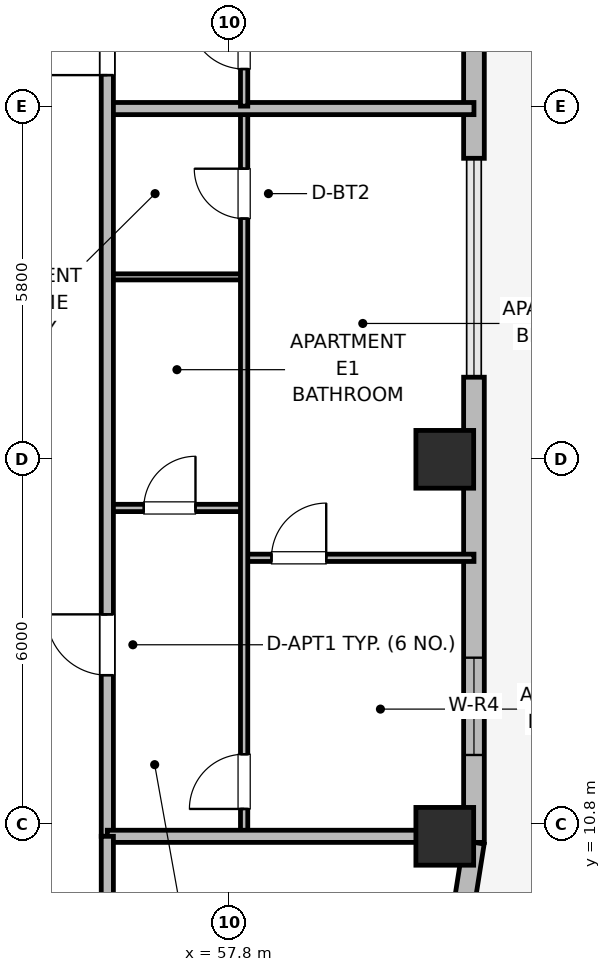
"""IFC4 building model, lengths in metres.
Left out: names, types, materials, properties, quantities, classifications, styles, units other than length and angle.
Written with IfcOpenShell. Run it as: python <this file> out.ifc"""

import sys

from ifc_helpers import new_model, si_unit, direction, frame, frame_2d, origin, origin_2d, place, context, subcontext, project, spatial, rectangle, extrude, element, fill, save


model = new_model("IFC4")
c1 = context("Model", 3, precision=1e-05, world=origin(), true_north=direction((0.0, 1.0)))
c2 = subcontext(c1, "Body", "Model", "MODEL_VIEW")
j1 = project(units=[si_unit("LENGTHUNIT", "METRE"), si_unit("PLANEANGLEUNIT", "RADIAN")], contexts=[c1])
p1 = place(None, origin())
s1 = spatial("IfcSite", under=j1, at=p1, CompositionType="ELEMENT")
p2 = place(p1, origin())
s2 = spatial("IfcBuilding", under=s1, at=p2, CompositionType="ELEMENT")
p3 = place(p2, frame((0.0, 0.0, 143.6)))
s3 = spatial("IfcBuildingStorey", under=s2, at=p3, CompositionType="ELEMENT", Elevation=143.6)
for number, where, z_axis, x_axis in (
    (1, (61.35, 10.6, 0.0), (0.0, 0.0, 1.0), (1.0, 0.0, 0.0)),
    (2, (61.35, 16.8, 0.0), (0.0, 0.0, 1.0), (1.0, 0.0, 0.0)),
):
    element("IfcColumn", number, at=place(p3, frame(where, z_axis=z_axis, x_axis=x_axis)), inside=s3, PredefinedType="COLUMN", context=c2, shape_type="SweptSolid", body=[
        extrude(rectangle(XDim=0.95, YDim=0.95, at=origin_2d()), origin(), (0.0, 0.0, 1.0), 4.2),
    ])
p4 = place(p3, frame((61.652, 9.378, 0.0), z_axis=(0.0, 0.0, 1.0), x_axis=(0.156514556949, 0.987675651954, 0.0)))
e3 = element("IfcWall", 3, at=p4, inside=s3, PredefinedType="SOLIDWALL", context=c2, shape_type="SweptSolid", body=[
    extrude(rectangle(XDim=1.135, YDim=0.34, at=frame_2d((0.568, 0.0))), origin(), (0.0, 0.0, 1.0), 3.22),
])
p5 = place(p3, frame((61.83, 10.5, 0.0), z_axis=(0.0, 0.0, 1.0), x_axis=(0.0, 1.0, 0.0)))
e4 = element("IfcWall", 4, at=p5, inside=s3, PredefinedType="SOLIDWALL", context=c2, shape_type="SweptSolid", body=[
    extrude(rectangle(XDim=7.65, YDim=0.34, at=frame_2d((3.825, 0.0))), origin(), (0.0, 0.0, 1.0), 3.22),
])
p6 = place(p5, frame((1.438, 0.0, 0.85)))
e5 = element("IfcOpeningElement", 5, at=p6, cuts=e4, PredefinedType="OPENING", context=c2, shape_type="SweptSolid", body=[
    extrude(rectangle(XDim=1.6, YDim=1.9, at=frame_2d((0.8, 0.95))), frame((0.0, 0.18, 0.0), z_axis=(0.0, -1.0, 0.0), x_axis=(1.0, 0.0, 0.0)), (0.0, 0.0, 1.0), 0.36),
])
p7 = place(p3, frame((61.83, 21.75, 0.0), z_axis=(0.0, 0.0, 1.0), x_axis=(0.0, 1.0, 0.0)))
e6 = element("IfcWall", 6, at=p7, inside=s3, PredefinedType="SOLIDWALL", context=c2, shape_type="SweptSolid", body=[
    extrude(rectangle(XDim=2.05, YDim=0.34, at=frame_2d((1.025, 0.0))), origin(), (0.0, 0.0, 1.0), 3.22),
])
p8 = place(p3, frame((55.8, 16.0, 0.0), z_axis=(0.0, 0.0, 1.0), x_axis=(1.0, 0.0, 0.0)))
e7 = element("IfcWall", 7, at=p8, inside=s3, PredefinedType="PARTITIONING", context=c2, shape_type="SweptSolid", body=[
    extrude(rectangle(XDim=2.25, YDim=0.12, at=frame_2d((1.125, 0.0))), origin(), (0.0, 0.0, 1.0), 3.05),
])
p9 = place(p8, frame((0.6, 0.0, 0.0)))
e8 = element("IfcOpeningElement", 8, at=p9, cuts=e7, PredefinedType="OPENING", context=c2, shape_type="SweptSolid", body=[
    extrude(rectangle(XDim=0.85, YDim=2.1, at=frame_2d((0.425, 1.05))), frame((0.0, 0.07, 0.0), z_axis=(0.0, -1.0, 0.0), x_axis=(1.0, 0.0, 0.0)), (0.0, 0.0, 1.0), 0.14),
])
p10 = place(p3, frame((55.8, 19.8, 0.0), z_axis=(0.0, 0.0, 1.0), x_axis=(1.0, 0.0, 0.0)))
e9 = element("IfcWall", 9, at=p10, inside=s3, PredefinedType="PARTITIONING", context=c2, shape_type="SweptSolid", body=[
    extrude(rectangle(XDim=2.25, YDim=0.1, at=frame_2d((1.125, 0.0))), origin(), (0.0, 0.0, 1.0), 3.05),
])
p11 = place(p3, frame((58.05, 15.18, 0.0), z_axis=(0.0, 0.0, 1.0), x_axis=(1.0, 0.0, 0.0)))
e10 = element("IfcWall", 10, at=p11, inside=s3, PredefinedType="PARTITIONING", context=c2, shape_type="SweptSolid", body=[
    extrude(rectangle(XDim=3.78, YDim=0.12, at=frame_2d((1.89, 0.0))), origin(), (0.0, 0.0, 1.0), 3.05),
])
p12 = place(p11, frame((0.45, 0.0, 0.0)))
e11 = element("IfcOpeningElement", 11, at=p12, cuts=e10, PredefinedType="OPENING", context=c2, shape_type="SweptSolid", body=[
    extrude(rectangle(XDim=0.9, YDim=2.1, at=frame_2d((0.45, 1.05))), frame((0.0, 0.07, 0.0), z_axis=(0.0, -1.0, 0.0), x_axis=(1.0, 0.0, 0.0)), (0.0, 0.0, 1.0), 0.14),
])
p13 = place(p3, frame((58.05, 10.64, 0.0), z_axis=(0.0, 0.0, 1.0), x_axis=(0.0, 1.0, 0.0)))
e12 = element("IfcWall", 12, at=p13, inside=s3, PredefinedType="PARTITIONING", context=c2, shape_type="SweptSolid", body=[
    extrude(rectangle(XDim=11.888, YDim=0.12, at=frame_2d((5.944, 0.0))), origin(), (0.0, 0.0, 1.0), 3.05),
])
p14 = place(p13, frame((0.41, 0.0, 0.0)))
e13 = element("IfcOpeningElement", 13, at=p14, cuts=e12, PredefinedType="OPENING", context=c2, shape_type="SweptSolid", body=[
    extrude(rectangle(XDim=0.9, YDim=2.1, at=frame_2d((0.45, 1.05))), frame((0.0, 0.07, 0.0), z_axis=(0.0, -1.0, 0.0), x_axis=(1.0, 0.0, 0.0)), (0.0, 0.0, 1.0), 0.14),
])
p15 = place(p13, frame((10.119, 0.0, 0.0)))
e14 = element("IfcOpeningElement", 14, at=p15, cuts=e12, PredefinedType="OPENING", context=c2, shape_type="SweptSolid", body=[
    extrude(rectangle(XDim=0.82, YDim=2.08, at=frame_2d((0.41, 1.04))), frame((0.0, 0.07, 0.0), z_axis=(0.0, -1.0, 0.0), x_axis=(1.0, 0.0, 0.0)), (0.0, 0.0, 1.0), 0.14),
])
p16 = place(p3, frame((55.8, 22.568, 0.0), z_axis=(0.0, 0.0, 1.0), x_axis=(1.0, 0.0, 0.0)))
e15 = element("IfcWall", 15, at=p16, inside=s3, PredefinedType="PARTITIONING", context=c2, shape_type="SweptSolid", body=[
    extrude(rectangle(XDim=6.03, YDim=0.2, at=frame_2d((3.015, 0.0))), origin(), (0.0, 0.0, 1.0), 3.05),
])
p17 = place(p3, frame((58.05, 22.608, 0.0), z_axis=(0.0, 0.0, 1.0), x_axis=(0.0, 1.0, 0.0)))
e16 = element("IfcWall", 16, at=p17, inside=s3, PredefinedType="PARTITIONING", context=c2, shape_type="SweptSolid", body=[
    extrude(rectangle(XDim=11.052, YDim=0.12, at=frame_2d((5.526, 0.0))), origin(), (0.0, 0.0, 1.0), 3.05),
])
p18 = place(p17, frame((0.61, 0.0, 0.0)))
e17 = element("IfcOpeningElement", 17, at=p18, cuts=e16, PredefinedType="OPENING", context=c2, shape_type="SweptSolid", body=[
    extrude(rectangle(XDim=0.9, YDim=2.1, at=frame_2d((0.45, 1.05))), frame((0.0, 0.07, 0.0), z_axis=(0.0, -1.0, 0.0), x_axis=(1.0, 0.0, 0.0)), (0.0, 0.0, 1.0), 0.14),
])
p19 = place(p3, frame((55.8, 10.6, 0.0), z_axis=(0.0, 0.0, 1.0), x_axis=(0.0, 1.0, 0.0)))
e18 = element("IfcWall", 18, at=p19, inside=s3, PredefinedType="PARTITIONING", context=c2, shape_type="SweptSolid", body=[
    extrude(rectangle(XDim=35.2, YDim=0.2, at=frame_2d((17.6, 0.0))), origin(), (0.0, 0.0, 1.0), 3.05),
])
p20 = place(p19, frame((2.65, 0.0, 0.0)))
e19 = element("IfcOpeningElement", 19, at=p20, cuts=e18, PredefinedType="OPENING", context=c2, shape_type="SweptSolid", body=[
    extrude(rectangle(XDim=1.0, YDim=2.15, at=frame_2d((0.5, 1.075))), frame((0.0, 0.11, 0.0), z_axis=(0.0, -1.0, 0.0), x_axis=(1.0, 0.0, 0.0)), (0.0, 0.0, 1.0), 0.22),
])
p21 = place(p19, frame((12.518, 0.0, 0.0)))
e20 = element("IfcOpeningElement", 20, at=p21, cuts=e18, PredefinedType="OPENING", context=c2, shape_type="SweptSolid", body=[
    extrude(rectangle(XDim=1.0, YDim=2.15, at=frame_2d((0.5, 1.075))), frame((0.0, 0.11, 0.0), z_axis=(0.0, -1.0, 0.0), x_axis=(1.0, 0.0, 0.0)), (0.0, 0.0, 1.0), 0.22),
])
p22 = place(p19, frame((23.65, 0.0, 0.0)))
e21 = element("IfcOpeningElement", 21, at=p22, cuts=e18, PredefinedType="OPENING", context=c2, shape_type="SweptSolid", body=[
    extrude(rectangle(XDim=1.0, YDim=2.15, at=frame_2d((0.5, 1.075))), frame((0.0, 0.11, 0.0), z_axis=(0.0, -1.0, 0.0), x_axis=(1.0, 0.0, 0.0)), (0.0, 0.0, 1.0), 0.22),
])
p23 = place(p3, frame((55.8, 10.6, 0.0), z_axis=(0.0, 0.0, 1.0), x_axis=(1.0, 0.0, 0.0)))
e22 = element("IfcWall", 22, at=p23, inside=s3, PredefinedType="PARTITIONING", context=c2, shape_type="SweptSolid", body=[
    extrude(rectangle(XDim=5.61, YDim=0.2, at=frame_2d((2.805, 0.0))), origin(), (0.0, 0.0, 1.0), 3.05),
])
p24 = place(p3, frame((55.8, 6.87, 0.0), z_axis=(0.0, 0.0, 1.0), x_axis=(0.0, 1.0, 0.0)))
e23 = element("IfcWall", 23, at=p24, inside=s3, PredefinedType="PARTITIONING", context=c2, shape_type="SweptSolid", body=[
    extrude(rectangle(XDim=3.73, YDim=0.2, at=frame_2d((1.865, 0.0))), origin(), (0.0, 0.0, 1.0), 3.05),
])
p25 = place(p6, origin())
e24 = element("IfcWindow", 24, at=p25, inside=s3, PartitioningType="SINGLE_PANEL", PredefinedType="WINDOW", context=c2, shape_type="SweptSolid", body=[
    extrude(rectangle(XDim=1.6, YDim=1.9, at=frame_2d((0.8, 0.95))), frame((0.0, 0.03, 0.0), z_axis=(0.0, -1.0, 0.0), x_axis=(1.0, 0.0, 0.0)), (0.0, 0.0, 1.0), 0.06),
])
fill(e5, e24)
p26 = place(p9, origin())
e25 = element("IfcDoor", 25, at=p26, inside=s3, OperationType="SINGLE_SWING_RIGHT", PredefinedType="DOOR", context=c2, shape_type="SweptSolid", body=[
    extrude(rectangle(XDim=0.85, YDim=2.1, at=frame_2d((0.425, 1.05))), frame((0.0, 0.025, 0.0), z_axis=(0.0, -1.0, 0.0), x_axis=(1.0, 0.0, 0.0)), (0.0, 0.0, 1.0), 0.05),
])
fill(e8, e25)
p27 = place(p12, origin())
e26 = element("IfcDoor", 26, at=p27, inside=s3, OperationType="SINGLE_SWING_RIGHT", PredefinedType="DOOR", context=c2, shape_type="SweptSolid", body=[
    extrude(rectangle(XDim=0.9, YDim=2.1, at=frame_2d((0.45, 1.05))), frame((0.0, 0.025, 0.0), z_axis=(0.0, -1.0, 0.0), x_axis=(1.0, 0.0, 0.0)), (0.0, 0.0, 1.0), 0.05),
])
fill(e11, e26)
p28 = place(p14, origin())
e27 = element("IfcDoor", 27, at=p28, inside=s3, OperationType="SINGLE_SWING_LEFT", PredefinedType="DOOR", context=c2, shape_type="SweptSolid", body=[
    extrude(rectangle(XDim=0.9, YDim=2.1, at=frame_2d((0.45, 1.05))), frame((0.0, 0.025, 0.0), z_axis=(0.0, -1.0, 0.0), x_axis=(1.0, 0.0, 0.0)), (0.0, 0.0, 1.0), 0.05),
])
fill(e13, e27)
p29 = place(p15, origin())
e28 = element("IfcDoor", 28, at=p29, inside=s3, OperationType="SINGLE_SWING_RIGHT", PredefinedType="DOOR", context=c2, shape_type="SweptSolid", body=[
    extrude(rectangle(XDim=0.82, YDim=2.08, at=frame_2d((0.41, 1.04))), frame((0.0, 0.025, 0.0), z_axis=(0.0, -1.0, 0.0), x_axis=(1.0, 0.0, 0.0)), (0.0, 0.0, 1.0), 0.05),
])
fill(e14, e28)
p30 = place(p18, origin())
e29 = element("IfcDoor", 29, at=p30, inside=s3, OperationType="SINGLE_SWING_RIGHT", PredefinedType="DOOR", context=c2, shape_type="SweptSolid", body=[
    extrude(rectangle(XDim=0.9, YDim=2.1, at=frame_2d((0.45, 1.05))), frame((0.0, 0.025, 0.0), z_axis=(0.0, -1.0, 0.0), x_axis=(1.0, 0.0, 0.0)), (0.0, 0.0, 1.0), 0.05),
])
fill(e17, e29)
p31 = place(p20, origin())
e30 = element("IfcDoor", 30, at=p31, inside=s3, OperationType="SINGLE_SWING_RIGHT", PredefinedType="DOOR", context=c2, shape_type="SweptSolid", body=[
    extrude(rectangle(XDim=1.0, YDim=2.15, at=frame_2d((0.5, 1.075))), frame((0.0, 0.025, 0.0), z_axis=(0.0, -1.0, 0.0), x_axis=(1.0, 0.0, 0.0)), (0.0, 0.0, 1.0), 0.05),
])
fill(e19, e30)
p32 = place(p21, origin())
e31 = element("IfcDoor", 31, at=p32, inside=s3, OperationType="SINGLE_SWING_LEFT", PredefinedType="DOOR", context=c2, shape_type="SweptSolid", body=[
    extrude(rectangle(XDim=1.0, YDim=2.15, at=frame_2d((0.5, 1.075))), frame((0.0, 0.025, 0.0), z_axis=(0.0, -1.0, 0.0), x_axis=(1.0, 0.0, 0.0)), (0.0, 0.0, 1.0), 0.05),
])
fill(e20, e31)
save(model, sys.argv[1])
